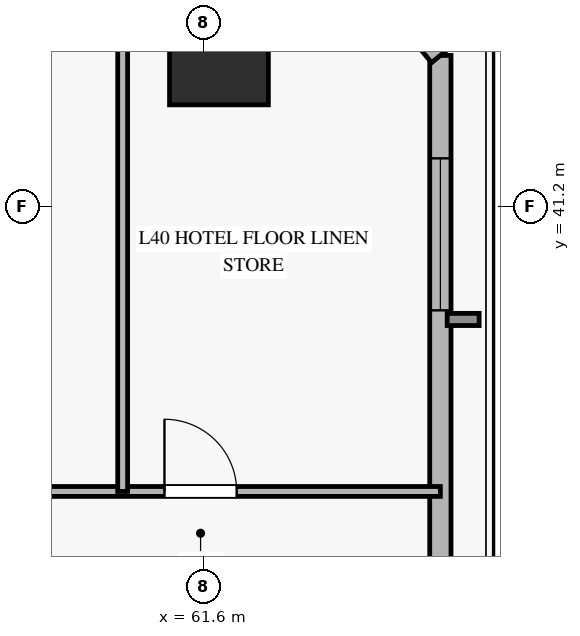
"""IFC4 building model, lengths in metres.
Left out: names, types, materials, properties, quantities, classifications, styles, units other than length and angle.
Written with IfcOpenShell. Run it as: python <this file> out.ifc"""

import sys

from ifc_helpers import new_model, si_unit, direction, frame, frame_2d, origin, origin_2d, place, context, subcontext, project, spatial, rectangle, hollow_rectangle, extrude, source, transform, mapped, element, fill, save


model = new_model("IFC4")
c1 = context("Model", 3, precision=1e-05, world=origin(), true_north=direction((0.0, 1.0)))
c2 = subcontext(c1, "Body", "Model", "MODEL_VIEW")
j1 = project(units=[si_unit("LENGTHUNIT", "METRE"), si_unit("PLANEANGLEUNIT", "RADIAN")], contexts=[c1])
p1 = place(None, origin())
s1 = spatial("IfcSite", under=j1, at=p1, CompositionType="ELEMENT")
p2 = place(p1, origin())
s2 = spatial("IfcBuilding", under=s1, at=p2, CompositionType="ELEMENT")
p3 = place(p2, frame((0.0, 0.0, 163.2)))
s3 = spatial("IfcBuildingStorey", under=s2, at=p3, CompositionType="ELEMENT", Elevation=163.2)
m1 = source(origin(), c2, "Body", "SweptSolid", [
    extrude(hollow_rectangle(XDim=1.3, YDim=1.3, WallThickness=0.06, at=origin_2d()), origin(), (0.0, 0.0, 1.0), 3.27),
])
p4 = place(p3, frame((61.803, 43.187, 0.0), z_axis=(0.0, 0.0, 1.0), x_axis=(1.0, 0.0, 0.0)))
e1 = element("IfcColumn", 1, at=p4, inside=s3, PredefinedType="COLUMN", context=c2, shape_type="MappedRepresentation", body=[
    mapped(m1, transform((0.0, 0.0, 0.0), x_axis=(1.0, 0.0, 0.0), y_axis=(0.0, 1.0, 0.0), z_axis=(0.0, 0.0, 1.0), scale=1.0)),
])
p5 = place(p3, frame((64.716, 27.999, 0.0), z_axis=(0.0, 0.0, 1.0), x_axis=(0.0, 1.0, 0.0)))
e2 = element("IfcWall", 2, at=p5, inside=s3, PredefinedType="SOLIDWALL", context=c2, shape_type="SweptSolid", body=[
    extrude(rectangle(XDim=15.188, YDim=0.28, at=frame_2d((7.594, 0.0))), origin(), (0.0, 0.0, 1.0), 2.75),
])
p6 = place(p5, frame((1.286, 0.0, 0.45)))
e3 = element("IfcOpeningElement", 3, at=p6, cuts=e2, PredefinedType="OPENING", context=c2, shape_type="SweptSolid", body=[
    extrude(rectangle(XDim=2.0, YDim=2.0, at=frame_2d((1.0, 1.0))), frame((0.0, 0.15, 0.0), z_axis=(0.0, -1.0, 0.0), x_axis=(1.0, 0.0, 0.0)), (0.0, 0.0, 1.0), 0.3),
])
p7 = place(p5, frame((11.834, 0.0, 0.45)))
e4 = element("IfcOpeningElement", 4, at=p7, cuts=e2, PredefinedType="OPENING", context=c2, shape_type="SweptSolid", body=[
    extrude(rectangle(XDim=2.0, YDim=2.0, at=frame_2d((1.0, 1.0))), frame((0.0, 0.15, 0.0), z_axis=(0.0, -1.0, 0.0), x_axis=(1.0, 0.0, 0.0)), (0.0, 0.0, 1.0), 0.3),
])
p8 = place(p3, frame((64.716, 43.187, 0.0), z_axis=(0.0, 0.0, 1.0), x_axis=(-0.634310946058, 0.773078019161, 0.0)))
e5 = element("IfcWall", 5, at=p8, inside=s3, PredefinedType="SOLIDWALL", context=c2, shape_type="SweptSolid", body=[
    extrude(rectangle(XDim=3.962, YDim=0.3, at=frame_2d((1.981, 0.0))), origin(), (0.0, 0.0, 1.0), 2.75),
])
p9 = place(p8, frame((1.181, 0.0, 0.45)))
e6 = element("IfcOpeningElement", 6, at=p9, cuts=e5, PredefinedType="OPENING", context=c2, shape_type="SweptSolid", body=[
    extrude(rectangle(XDim=1.6, YDim=2.0, at=frame_2d((0.8, 1.0))), frame((0.0, 0.16, 0.0), z_axis=(0.0, -1.0, 0.0), x_axis=(1.0, 0.0, 0.0)), (0.0, 0.0, 1.0), 0.32),
])
p10 = place(p3, frame((51.15, 37.45, 0.0), z_axis=(0.0, 0.0, 1.0), x_axis=(1.0, 0.0, 0.0)))
e7 = element("IfcWall", 7, at=p10, inside=s3, PredefinedType="PARTITIONING", context=c2, shape_type="SweptSolid", body=[
    extrude(rectangle(XDim=13.566, YDim=0.13, at=frame_2d((6.783, 0.0))), origin(), (0.0, 0.0, 1.0), 2.755),
])
p11 = place(p10, frame((0.5, 0.0, 0.0)))
e8 = element("IfcOpeningElement", 8, at=p11, cuts=e7, PredefinedType="OPENING", context=c2, shape_type="SweptSolid", body=[
    extrude(rectangle(XDim=0.9, YDim=2.1, at=frame_2d((0.45, 1.05))), frame((0.0, 0.075, 0.0), z_axis=(0.0, -1.0, 0.0), x_axis=(1.0, 0.0, 0.0)), (0.0, 0.0, 1.0), 0.15),
])
p12 = place(p10, frame((9.936, 0.0, 0.0)))
e9 = element("IfcOpeningElement", 9, at=p12, cuts=e7, PredefinedType="OPENING", context=c2, shape_type="SweptSolid", body=[
    extrude(rectangle(XDim=0.95, YDim=2.1, at=frame_2d((0.475, 1.05))), frame((0.0, 0.075, 0.0), z_axis=(0.0, -1.0, 0.0), x_axis=(1.0, 0.0, 0.0)), (0.0, 0.0, 1.0), 0.15),
])
p13 = place(p3, frame((60.536, 37.45, 0.0), z_axis=(0.0, 0.0, 1.0), x_axis=(0.0, 1.0, 0.0)))
e10 = element("IfcWall", 10, at=p13, inside=s3, PredefinedType="PARTITIONING", context=c2, shape_type="SweptSolid", body=[
    extrude(rectangle(XDim=8.8, YDim=0.13, at=frame_2d((4.4, 0.0))), origin(), (0.0, 0.0, 1.0), 3.27),
])
m2 = source(origin(), c2, "Body", "SweptSolid", [
    extrude(rectangle(XDim=2.0, YDim=2.0, at=frame_2d((1.0, 1.0))), frame((0.0, 0.03, 0.0), z_axis=(0.0, -1.0, 0.0), x_axis=(1.0, 0.0, 0.0)), (0.0, 0.0, 1.0), 0.06),
])
p14 = place(p7, origin())
e11 = element("IfcWindow", 11, at=p14, inside=s3, PartitioningType="SINGLE_PANEL", PredefinedType="WINDOW", context=c2, shape_type="MappedRepresentation", body=[
    mapped(m2, transform((0.0, 0.0, 0.0), x_axis=(1.0, 0.0, 0.0), y_axis=(0.0, 1.0, 0.0), z_axis=(0.0, 0.0, 1.0), scale=1.0)),
])
fill(e4, e11)
m3 = source(origin(), c2, "Body", "SweptSolid", [
    extrude(rectangle(XDim=0.95, YDim=2.1, at=frame_2d((0.475, 1.05))), frame((0.0, 0.025, 0.0), z_axis=(0.0, -1.0, 0.0), x_axis=(1.0, 0.0, 0.0)), (0.0, 0.0, 1.0), 0.05),
])
p15 = place(p12, origin())
e12 = element("IfcDoor", 12, at=p15, inside=s3, OperationType="SINGLE_SWING_LEFT", PredefinedType="DOOR", context=c2, shape_type="MappedRepresentation", body=[
    mapped(m3, transform((0.0, 0.0, 0.0), x_axis=(1.0, 0.0, 0.0), y_axis=(0.0, 1.0, 0.0), z_axis=(0.0, 0.0, 1.0), scale=1.0)),
])
fill(e9, e12)
save(model, sys.argv[1])
